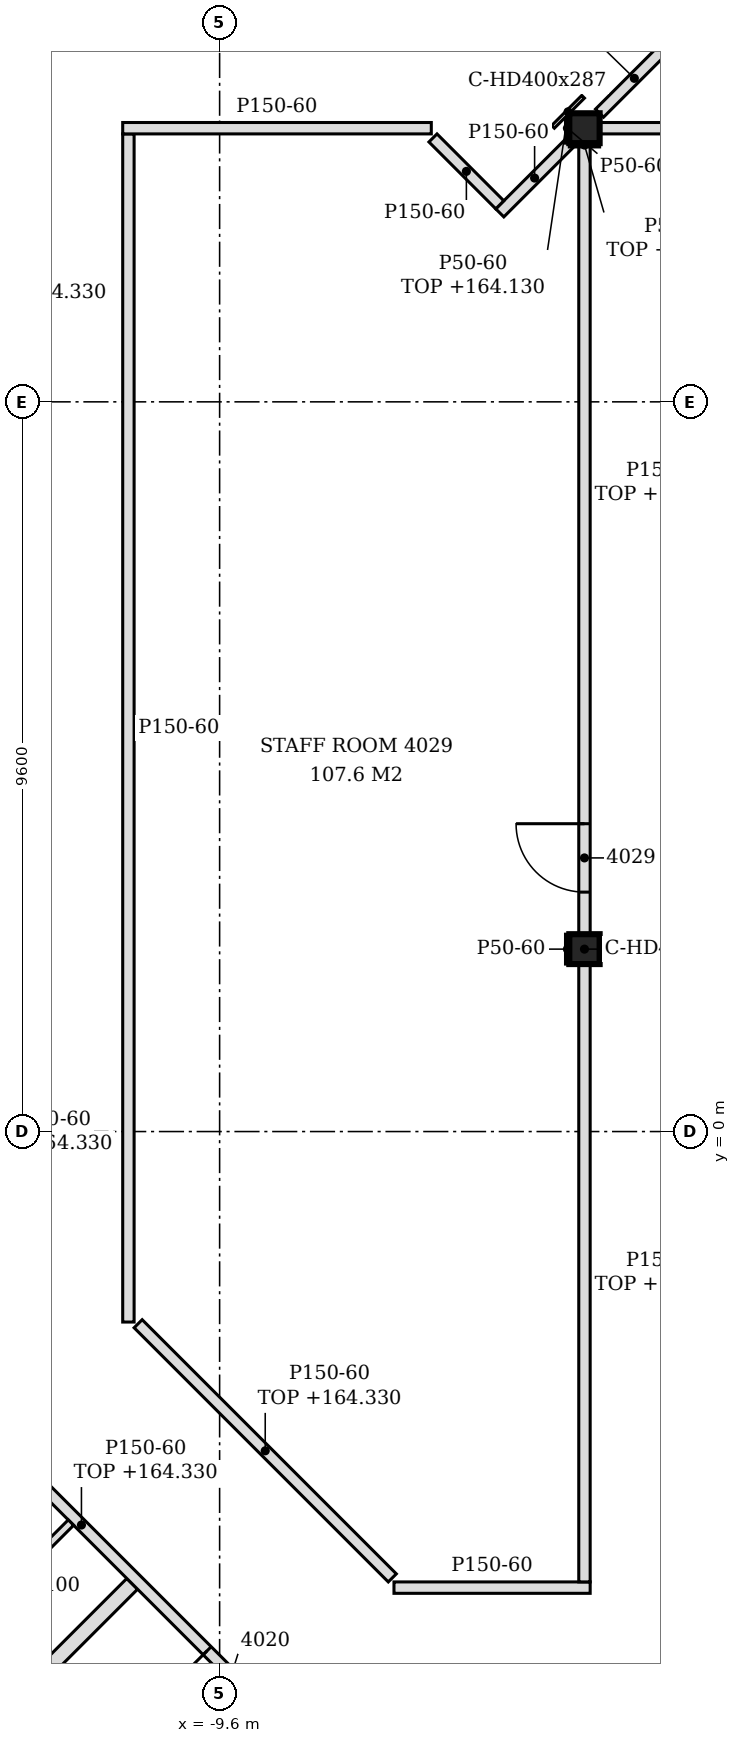
"""IFC4 building model, lengths in metres.
Left out: names, types, materials, properties, quantities, classifications, styles, units other than length and angle.
Written with IfcOpenShell. Run it as: python <this file> out.ifc"""

import sys

from ifc_helpers import new_model, si_unit, direction, frame, frame_2d, origin, origin_2d, place, context, subcontext, project, spatial, polyline, rectangle, i_section, outline, extrude, element, fill, save


model = new_model("IFC4")
c1 = context("Model", 3, precision=1e-05, world=origin(), true_north=direction((0.0, 1.0)))
c2 = subcontext(c1, "Body", "Model", "MODEL_VIEW")
j1 = project(units=[si_unit("LENGTHUNIT", "METRE"), si_unit("PLANEANGLEUNIT", "RADIAN")], contexts=[c1])
p1 = place(None, origin())
s1 = spatial("IfcSite", under=j1, at=p1, CompositionType="ELEMENT")
p2 = place(p1, origin())
s2 = spatial("IfcBuilding", under=s1, at=p2, CompositionType="ELEMENT")
p3 = place(p2, frame((0.0, 0.0, 161.4)))
s3 = spatial("IfcBuildingStorey", under=s2, at=p3, CompositionType="ELEMENT", Elevation=161.4)
for number, where, z_axis, x_axis in (
    (1, (-4.8, 2.4, -0.15), (0.0, 0.0, 1.0), (1.0, 0.0, 0.0)),
    (2, (-4.8, 13.2, -0.15), (0.0, 0.0, 1.0), (1.0, 0.0, 0.0)),
):
    element("IfcColumn", number, at=place(p3, frame(where, z_axis=z_axis, x_axis=x_axis)), inside=s3, PredefinedType="COLUMN", context=c2, shape_type="SweptSolid", body=[
        extrude(i_section(OverallWidth=0.399, OverallDepth=0.393, WebThickness=0.023, FlangeThickness=0.037, FilletRadius=0.015, at=origin_2d()), origin(), (0.0, 0.0, 1.0), 3.6),
    ])
p4 = place(p3, frame((-14.202, -9.402, 0.0), z_axis=(0.0, 0.0, 1.0), x_axis=(0.707081776084, 0.707131785404, 0.0)))
e3 = element("IfcWall", 3, at=p4, inside=s3, PredefinedType="PARTITIONING", context=c2, shape_type="SweptSolid", body=[
    extrude(rectangle(XDim=4.882, YDim=0.2, at=frame_2d((2.441, 0.0))), origin(), (0.0, 0.0, 1.0), 2.93),
])
p5 = place(p3, frame((-8.322, -8.272, 0.0), z_axis=(0.0, 0.0, 1.0), x_axis=(-0.707106781187, 0.707106781187, 0.0)))
e4 = element("IfcWall", 4, at=p5, inside=s3, PredefinedType="PARTITIONING", context=c2, shape_type="SweptSolid", body=[
    extrude(rectangle(XDim=6.718, YDim=0.15, at=frame_2d((3.359, 0.0))), origin(), (0.0, 0.0, 1.0), 2.93),
])
p6 = place(p5, frame((1.139, 0.0, 0.0)))
e5 = element("IfcOpeningElement", 5, at=p6, cuts=e4, PredefinedType="OPENING", context=c2, shape_type="SweptSolid", body=[
    extrude(rectangle(XDim=0.9, YDim=2.1, at=frame_2d((0.45, 1.05))), frame((0.0, 0.085, 0.0), z_axis=(0.0, -1.0, 0.0), x_axis=(1.0, 0.0, 0.0)), (0.0, 0.0, 1.0), 0.17),
])
p7 = place(p3, frame((-13.235, -6.823, 0.0), z_axis=(0.0, 0.0, 1.0), x_axis=(0.707106781187, 0.707106781187, 0.0)))
e6 = element("IfcWall", 6, at=p7, inside=s3, PredefinedType="PARTITIONING", context=c2, shape_type="SweptSolid", body=[
    extrude(rectangle(XDim=2.375, YDim=0.1, at=frame_2d((1.188, 0.0))), origin(), (0.0, 0.0, 1.0), 3.45),
])
p8 = place(p3, frame((-7.306, -6.0, 0.0), z_axis=(0.0, 0.0, 1.0), x_axis=(1.0, 0.0, 0.0)))
e7 = element("IfcWall", 7, at=p8, inside=s3, PredefinedType="PARTITIONING", context=c2, shape_type="SweptSolid", body=[
    extrude(outline(polyline([(0.0, 0.0), (2.581, 0.0), (2.581, 2.83), (2.356, 2.83), (2.354, 3.45), (0.0, 3.45), (0.0, 0.0)])), frame((0.0, 0.075, 0.0), z_axis=(0.0, -1.0, 0.0), x_axis=(1.0, 0.0, 0.0)), (0.0, 0.0, 1.0), 0.15),
])
p9 = place(p3, frame((-7.328, -5.872, 0.0), z_axis=(0.0, 0.0, 1.0), x_axis=(-0.707106781187, 0.707106781187, 0.0)))
e8 = element("IfcWall", 8, at=p9, inside=s3, PredefinedType="PARTITIONING", context=c2, shape_type="SweptSolid", body=[
    extrude(rectangle(XDim=4.729, YDim=0.15, at=frame_2d((2.365, 0.0))), origin(), (0.0, 0.0, 1.0), 2.93),
])
p10 = place(p3, frame((-4.8, -5.925, 0.0), z_axis=(0.0, 0.0, 1.0), x_axis=(0.0, 1.0, 0.0)))
e9 = element("IfcWall", 9, at=p10, inside=s3, PredefinedType="PARTITIONING", context=c2, shape_type="SweptSolid", body=[
    extrude(rectangle(XDim=8.129, YDim=0.15, at=frame_2d((4.064, 0.0))), origin(), (0.0, 0.0, 1.0), 2.83),
])
p11 = place(p3, frame((-10.8, -2.506, 0.0), z_axis=(0.0, 0.0, 1.0), x_axis=(0.0, 1.0, 0.0)))
e10 = element("IfcWall", 10, at=p11, inside=s3, PredefinedType="PARTITIONING", context=c2, shape_type="SweptSolid", body=[
    extrude(outline(polyline([(0.0, 0.0), (15.631, 0.0), (15.631, 3.45), (12.206, 3.45), (12.204, 2.93), (12.006, 2.93), (12.004, 3.45), (7.406, 3.45), (7.404, 2.93), (7.206, 2.93), (7.204, 3.45), (2.606, 3.45), (2.604, 2.93), (2.406, 2.93), (2.404, 3.45), (0.0, 3.45), (0.0, 0.0)])), frame((0.0, 0.075, 0.0), z_axis=(0.0, -1.0, 0.0), x_axis=(1.0, 0.0, 0.0)), (0.0, 0.0, 1.0), 0.15),
])
p12 = place(p3, frame((-4.8, 2.596, 0.0), z_axis=(0.0, 0.0, 1.0), x_axis=(0.0, 1.0, 0.0)))
e11 = element("IfcWall", 11, at=p12, inside=s3, PredefinedType="PARTITIONING", context=c2, shape_type="SweptSolid", body=[
    extrude(rectangle(XDim=10.407, YDim=0.15, at=frame_2d((5.204, 0.0))), origin(), (0.0, 0.0, 1.0), 2.83),
])
p13 = place(p12, frame((0.553, 0.0, 0.0)))
e12 = element("IfcOpeningElement", 12, at=p13, cuts=e11, PredefinedType="OPENING", context=c2, shape_type="SweptSolid", body=[
    extrude(rectangle(XDim=0.9, YDim=2.1, at=frame_2d((0.45, 1.05))), frame((0.0, 0.085, 0.0), z_axis=(0.0, -1.0, 0.0), x_axis=(1.0, 0.0, 0.0)), (0.0, 0.0, 1.0), 0.17),
])
p14 = place(p3, frame((-5.914, 12.086, 0.0), z_axis=(0.0, 0.0, 1.0), x_axis=(0.707106781187, 0.707106781187, 0.0)))
e13 = element("IfcWall", 13, at=p14, inside=s3, PredefinedType="PARTITIONING", context=c2, shape_type="SweptSolid", body=[
    extrude(rectangle(XDim=1.295, YDim=0.15, at=frame_2d((0.648, 0.0))), origin(), (0.0, 0.0, 1.0), 3.45),
])
p15 = place(p3, frame((-5.914, 12.192, 0.0), z_axis=(0.0, 0.0, 1.0), x_axis=(-0.706812296552, 0.70740114323, 0.0)))
e14 = element("IfcWall", 14, at=p15, inside=s3, PredefinedType="PARTITIONING", context=c2, shape_type="SweptSolid", body=[
    extrude(rectangle(XDim=1.244, YDim=0.15, at=frame_2d((0.622, 0.0))), origin(), (0.0, 0.0, 1.0), 3.45),
])
p16 = place(p3, frame((-10.875, 13.2, 0.0), z_axis=(0.0, 0.0, 1.0), x_axis=(1.0, 0.0, 0.0)))
e15 = element("IfcWall", 15, at=p16, inside=s3, PredefinedType="PARTITIONING", context=c2, shape_type="SweptSolid", body=[
    extrude(rectangle(XDim=4.06, YDim=0.15, at=frame_2d((2.03, 0.0))), origin(), (0.0, 0.0, 1.0), 3.45),
])
p17 = place(p3, frame((-4.601, 13.2, 0.0), z_axis=(0.0, 0.0, 1.0), x_axis=(1.0, 0.0, 0.0)))
e16 = element("IfcWall", 16, at=p17, inside=s3, PredefinedType="PARTITIONING", context=c2, shape_type="SweptSolid", body=[
    extrude(rectangle(XDim=4.676, YDim=0.15, at=frame_2d((2.338, 0.0))), origin(), (0.0, 0.0, 1.0), 2.83),
])
p18 = place(p17, frame((1.75, 0.0, 0.0)))
e17 = element("IfcOpeningElement", 17, at=p18, cuts=e16, PredefinedType="OPENING", context=c2, shape_type="SweptSolid", body=[
    extrude(rectangle(XDim=0.9, YDim=2.1, at=frame_2d((0.45, 1.05))), frame((0.0, 0.085, 0.0), z_axis=(0.0, -1.0, 0.0), x_axis=(1.0, 0.0, 0.0)), (0.0, 0.0, 1.0), 0.17),
])
p19 = place(p3, frame((-4.602, 13.398, 0.0), z_axis=(0.0, 0.0, 1.0), x_axis=(0.707106781187, 0.707106781187, 0.0)))
e18 = element("IfcWall", 18, at=p19, inside=s3, PredefinedType="PARTITIONING", context=c2, shape_type="SweptSolid", body=[
    extrude(rectangle(XDim=1.296, YDim=0.15, at=frame_2d((0.648, 0.0))), origin(), (0.0, 0.0, 1.0), 3.45),
])
p20 = place(p3, frame((-13.275, 14.24, 0.0), z_axis=(0.0, 0.0, 1.0), x_axis=(0.707286821097, 0.706926695424, 0.0)))
e19 = element("IfcWall", 19, at=p20, inside=s3, PredefinedType="PARTITIONING", context=c2, shape_type="SweptSolid", body=[
    extrude(rectangle(XDim=2.712, YDim=0.15, at=frame_2d((1.356, 0.0))), origin(), (0.0, 0.0, 1.0), 2.93),
])
p21 = place(p3, frame((-5.024, 2.204, 0.0), z_axis=(0.0, 0.0, 1.0), x_axis=(0.0, 1.0, 0.0)))
e20 = element("IfcWall", 20, at=p21, inside=s3, PredefinedType="PARTITIONING", context=c2, shape_type="SweptSolid", body=[
    extrude(rectangle(XDim=0.393, YDim=0.05, at=frame_2d((0.196, 0.0))), origin(), (0.0, 0.0, 1.0), 3.45),
])
p22 = place(p3, frame((-5.024, 13.003, 0.0), z_axis=(0.0, 0.0, 1.0), x_axis=(0.0, 1.0, 0.0)))
e21 = element("IfcWall", 21, at=p22, inside=s3, PredefinedType="PARTITIONING", context=c2, shape_type="SweptSolid", body=[
    extrude(rectangle(XDim=0.393, YDim=0.05, at=frame_2d((0.197, 0.0))), origin(), (0.0, 0.0, 1.0), 3.45),
])
p23 = place(p3, frame((-5.214, 13.218, 0.0), z_axis=(0.0, 0.0, 1.0), x_axis=(0.707106781187, 0.707106781187, 0.0)))
e22 = element("IfcWall", 22, at=p23, inside=s3, PredefinedType="PARTITIONING", context=c2, shape_type="SweptSolid", body=[
    extrude(rectangle(XDim=0.56, YDim=0.05, at=frame_2d((0.28, 0.0))), origin(), (0.0, 0.0, 1.0), 2.73),
])
p24 = place(p3, frame((-5.0, 12.979, 0.0), z_axis=(0.0, 0.0, 1.0), x_axis=(1.0, 0.0, 0.0)))
e23 = element("IfcWall", 23, at=p24, inside=s3, PredefinedType="PARTITIONING", context=c2, shape_type="SweptSolid", body=[
    extrude(rectangle(XDim=0.399, YDim=0.05, at=frame_2d((0.199, 0.0))), origin(), (0.0, 0.0, 1.0), 2.83),
])
p25 = place(p6, origin())
e24 = element("IfcDoor", 24, at=p25, inside=s3, OperationType="SINGLE_SWING_RIGHT", PredefinedType="DOOR", context=c2, shape_type="SweptSolid", body=[
    extrude(rectangle(XDim=0.9, YDim=2.1, at=frame_2d((0.45, 1.05))), frame((0.0, 0.025, 0.0), z_axis=(0.0, -1.0, 0.0), x_axis=(1.0, 0.0, 0.0)), (0.0, 0.0, 1.0), 0.05),
])
fill(e5, e24)
p26 = place(p13, origin())
e25 = element("IfcDoor", 25, at=p26, inside=s3, OperationType="SINGLE_SWING_RIGHT", PredefinedType="DOOR", context=c2, shape_type="SweptSolid", body=[
    extrude(rectangle(XDim=0.9, YDim=2.1, at=frame_2d((0.45, 1.05))), frame((0.0, 0.025, 0.0), z_axis=(0.0, -1.0, 0.0), x_axis=(1.0, 0.0, 0.0)), (0.0, 0.0, 1.0), 0.05),
])
fill(e12, e25)
save(model, sys.argv[1])
